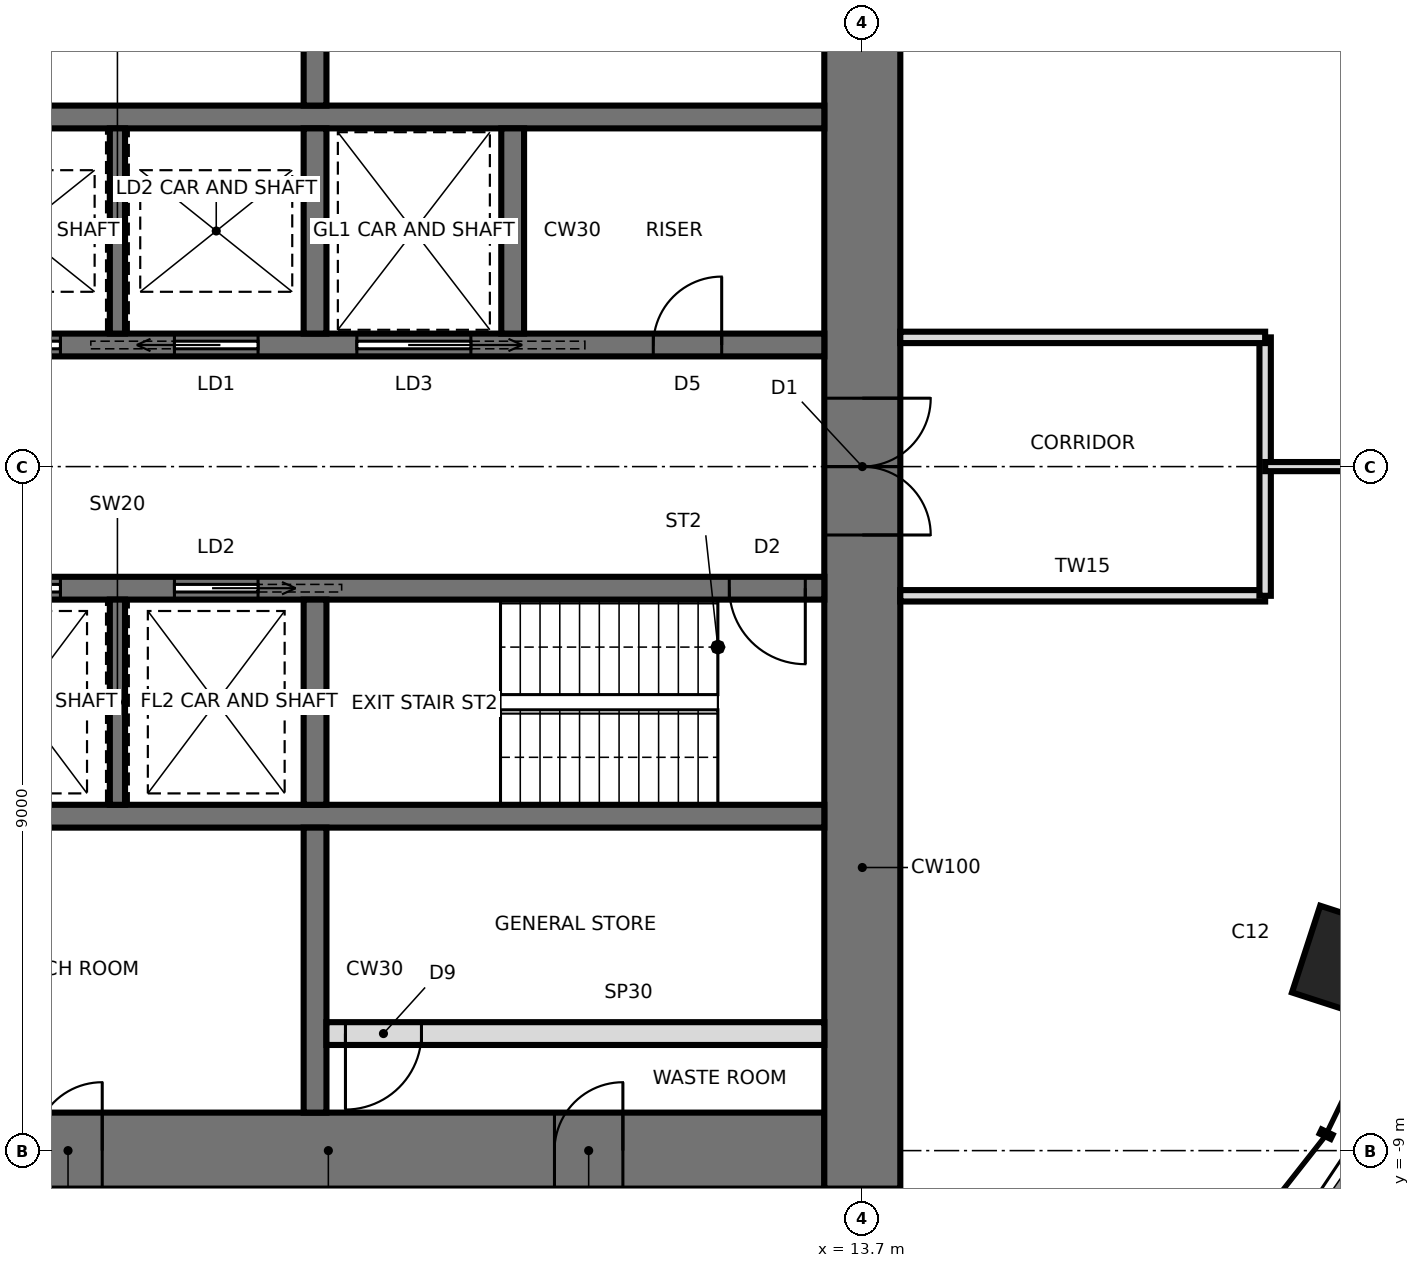
"""IFC4 building model, lengths in metres.
Left out: names, types, materials, properties, quantities, classifications, styles, units other than length and angle.
Written with IfcOpenShell. Run it as: python <this file> out.ifc"""

import sys

from ifc_helpers import new_model, si_unit, direction, frame, frame_2d, origin, origin_2d, place, context, subcontext, project, spatial, rectangle, extrude, element, fill, save


model = new_model("IFC4")
c1 = context("Model", 3, precision=1e-05, world=origin(), true_north=direction((0.0, 1.0)))
c2 = subcontext(c1, "Body", "Model", "MODEL_VIEW")
j1 = project(units=[si_unit("LENGTHUNIT", "METRE"), si_unit("PLANEANGLEUNIT", "RADIAN")], contexts=[c1])
p1 = place(None, origin())
s1 = spatial("IfcSite", under=j1, at=p1, CompositionType="ELEMENT")
p2 = place(p1, origin())
s2 = spatial("IfcBuilding", under=s1, at=p2, CompositionType="ELEMENT")
p3 = place(p2, frame((0.0, 0.0, 272.8)))
s3 = spatial("IfcBuildingStorey", under=s2, at=p3, CompositionType="ELEMENT", Elevation=272.8)
p4 = place(p3, frame((20.109, -6.534, 0.0), z_axis=(0.0, 0.0, 1.0), x_axis=(0.951056516295, -0.309016994375, 0.0)))
e1 = element("IfcColumn", 1, at=p4, inside=s3, PredefinedType="COLUMN", context=c2, shape_type="SweptSolid", body=[
    extrude(rectangle(XDim=1.2, YDim=1.2, at=origin_2d()), origin(), (0.0, 0.0, 1.0), 4.2),
])
p5 = place(p3, frame((-13.2, -9.0, 0.0), z_axis=(0.0, 0.0, 1.0), x_axis=(1.0, 0.0, 0.0)))
e2 = element("IfcWall", 2, at=p5, inside=s3, PredefinedType="SHEAR", context=c2, shape_type="SweptSolid", body=[
    extrude(rectangle(XDim=26.4, YDim=1.0, at=frame_2d((13.2, 0.0))), origin(), (0.0, 0.0, 1.0), 4.2),
])
p6 = place(p5, frame((2.65, 0.0, 0.0)))
e3 = element("IfcOpeningElement", 3, at=p6, cuts=e2, PredefinedType="OPENING", context=c2, shape_type="SweptSolid", body=[
    extrude(rectangle(XDim=0.9, YDim=2.1, at=frame_2d((0.45, 1.05))), frame((0.0, 0.51, 0.0), z_axis=(0.0, -1.0, 0.0), x_axis=(1.0, 0.0, 0.0)), (0.0, 0.0, 1.0), 1.02),
])
p7 = place(p5, frame((9.5, 0.0, 0.0)))
e4 = element("IfcOpeningElement", 4, at=p7, cuts=e2, PredefinedType="OPENING", context=c2, shape_type="SweptSolid", body=[
    extrude(rectangle(XDim=0.9, YDim=2.1, at=frame_2d((0.45, 1.05))), frame((0.0, 0.51, 0.0), z_axis=(0.0, -1.0, 0.0), x_axis=(1.0, 0.0, 0.0)), (0.0, 0.0, 1.0), 1.02),
])
p8 = place(p5, frame((16.0, 0.0, 0.0)))
e5 = element("IfcOpeningElement", 5, at=p8, cuts=e2, PredefinedType="OPENING", context=c2, shape_type="SweptSolid", body=[
    extrude(rectangle(XDim=0.9, YDim=2.1, at=frame_2d((0.45, 1.05))), frame((0.0, 0.51, 0.0), z_axis=(0.0, -1.0, 0.0), x_axis=(1.0, 0.0, 0.0)), (0.0, 0.0, 1.0), 1.02),
])
p9 = place(p5, frame((22.85, 0.0, 0.0)))
e6 = element("IfcOpeningElement", 6, at=p9, cuts=e2, PredefinedType="OPENING", context=c2, shape_type="SweptSolid", body=[
    extrude(rectangle(XDim=0.9, YDim=2.1, at=frame_2d((0.45, 1.05))), frame((0.0, 0.51, 0.0), z_axis=(0.0, -1.0, 0.0), x_axis=(1.0, 0.0, 0.0)), (0.0, 0.0, 1.0), 1.02),
])
p10 = place(p3, frame((13.7, -9.5, 0.0), z_axis=(0.0, 0.0, 1.0), x_axis=(0.0, 1.0, 0.0)))
e7 = element("IfcWall", 7, at=p10, inside=s3, PredefinedType="SHEAR", context=c2, shape_type="SweptSolid", body=[
    extrude(rectangle(XDim=19.0, YDim=1.0, at=frame_2d((9.5, 0.0))), origin(), (0.0, 0.0, 1.0), 4.2),
])
p11 = place(p10, frame((8.6, 0.0, 0.0)))
e8 = element("IfcOpeningElement", 8, at=p11, cuts=e7, PredefinedType="OPENING", context=c2, shape_type="SweptSolid", body=[
    extrude(rectangle(XDim=1.8, YDim=2.4, at=frame_2d((0.9, 1.2))), frame((0.0, 0.51, 0.0), z_axis=(0.0, -1.0, 0.0), x_axis=(1.0, 0.0, 0.0)), (0.0, 0.0, 1.0), 1.02),
])
p12 = place(p3, frame((-13.2, 1.6, 0.0), z_axis=(0.0, 0.0, 1.0), x_axis=(1.0, 0.0, 0.0)))
e9 = element("IfcWall", 9, at=p12, inside=s3, PredefinedType="SHEAR", context=c2, shape_type="SweptSolid", body=[
    extrude(rectangle(XDim=26.4, YDim=0.3, at=frame_2d((13.2, 0.0))), origin(), (0.0, 0.0, 1.0), 4.2),
])
p13 = place(p12, frame((0.25, 0.0, 0.0)))
e10 = element("IfcOpeningElement", 10, at=p13, cuts=e9, PredefinedType="OPENING", context=c2, shape_type="SweptSolid", body=[
    extrude(rectangle(XDim=1.0, YDim=2.1, at=frame_2d((0.5, 1.05))), frame((0.0, 0.16, 0.0), z_axis=(0.0, -1.0, 0.0), x_axis=(1.0, 0.0, 0.0)), (0.0, 0.0, 1.0), 0.32),
])
p14 = place(p12, frame((20.25, 0.0, 0.0)))
e11 = element("IfcOpeningElement", 11, at=p14, cuts=e9, PredefinedType="OPENING", context=c2, shape_type="SweptSolid", body=[
    extrude(rectangle(XDim=1.5, YDim=2.4, at=frame_2d((0.75, 1.2))), frame((0.0, 0.16, 0.0), z_axis=(0.0, -1.0, 0.0), x_axis=(1.0, 0.0, 0.0)), (0.0, 0.0, 1.0), 0.32),
])
p15 = place(p12, frame((7.55, 0.0, 0.0)))
e12 = element("IfcOpeningElement", 12, at=p15, cuts=e9, PredefinedType="OPENING", context=c2, shape_type="SweptSolid", body=[
    extrude(rectangle(XDim=0.9, YDim=2.1, at=frame_2d((0.45, 1.05))), frame((0.0, 0.16, 0.0), z_axis=(0.0, -1.0, 0.0), x_axis=(1.0, 0.0, 0.0)), (0.0, 0.0, 1.0), 0.32),
])
p16 = place(p12, frame((10.15, 0.0, 0.0)))
e13 = element("IfcOpeningElement", 13, at=p16, cuts=e9, PredefinedType="OPENING", context=c2, shape_type="SweptSolid", body=[
    extrude(rectangle(XDim=0.9, YDim=2.1, at=frame_2d((0.45, 1.05))), frame((0.0, 0.16, 0.0), z_axis=(0.0, -1.0, 0.0), x_axis=(1.0, 0.0, 0.0)), (0.0, 0.0, 1.0), 0.32),
])
p17 = place(p12, frame((12.75, 0.0, 0.0)))
e14 = element("IfcOpeningElement", 14, at=p17, cuts=e9, PredefinedType="OPENING", context=c2, shape_type="SweptSolid", body=[
    extrude(rectangle(XDim=0.9, YDim=2.1, at=frame_2d((0.45, 1.05))), frame((0.0, 0.16, 0.0), z_axis=(0.0, -1.0, 0.0), x_axis=(1.0, 0.0, 0.0)), (0.0, 0.0, 1.0), 0.32),
])
p18 = place(p12, frame((15.25, 0.0, 0.0)))
e15 = element("IfcOpeningElement", 15, at=p18, cuts=e9, PredefinedType="OPENING", context=c2, shape_type="SweptSolid", body=[
    extrude(rectangle(XDim=1.1, YDim=2.3, at=frame_2d((0.55, 1.15))), frame((0.0, 0.16, 0.0), z_axis=(0.0, -1.0, 0.0), x_axis=(1.0, 0.0, 0.0)), (0.0, 0.0, 1.0), 0.32),
])
p19 = place(p12, frame((17.85, 0.0, 0.0)))
e16 = element("IfcOpeningElement", 16, at=p19, cuts=e9, PredefinedType="OPENING", context=c2, shape_type="SweptSolid", body=[
    extrude(rectangle(XDim=1.1, YDim=2.3, at=frame_2d((0.55, 1.15))), frame((0.0, 0.16, 0.0), z_axis=(0.0, -1.0, 0.0), x_axis=(1.0, 0.0, 0.0)), (0.0, 0.0, 1.0), 0.32),
])
p20 = place(p12, frame((24.15, 0.0, 0.0)))
e17 = element("IfcOpeningElement", 17, at=p20, cuts=e9, PredefinedType="OPENING", context=c2, shape_type="SweptSolid", body=[
    extrude(rectangle(XDim=0.9, YDim=2.1, at=frame_2d((0.45, 1.05))), frame((0.0, 0.16, 0.0), z_axis=(0.0, -1.0, 0.0), x_axis=(1.0, 0.0, 0.0)), (0.0, 0.0, 1.0), 0.32),
])
p21 = place(p3, frame((-13.2, -1.6, 0.0), z_axis=(0.0, 0.0, 1.0), x_axis=(1.0, 0.0, 0.0)))
e18 = element("IfcWall", 18, at=p21, inside=s3, PredefinedType="SHEAR", context=c2, shape_type="SweptSolid", body=[
    extrude(rectangle(XDim=26.4, YDim=0.3, at=frame_2d((13.2, 0.0))), origin(), (0.0, 0.0, 1.0), 4.2),
])
p22 = place(p21, frame((25.15, 0.0, 0.0)))
e19 = element("IfcOpeningElement", 19, at=p22, cuts=e18, PredefinedType="OPENING", context=c2, shape_type="SweptSolid", body=[
    extrude(rectangle(XDim=1.0, YDim=2.1, at=frame_2d((0.5, 1.05))), frame((0.0, 0.16, 0.0), z_axis=(0.0, -1.0, 0.0), x_axis=(1.0, 0.0, 0.0)), (0.0, 0.0, 1.0), 0.32),
])
p23 = place(p21, frame((7.55, 0.0, 0.0)))
e20 = element("IfcOpeningElement", 20, at=p23, cuts=e18, PredefinedType="OPENING", context=c2, shape_type="SweptSolid", body=[
    extrude(rectangle(XDim=0.9, YDim=2.1, at=frame_2d((0.45, 1.05))), frame((0.0, 0.16, 0.0), z_axis=(0.0, -1.0, 0.0), x_axis=(1.0, 0.0, 0.0)), (0.0, 0.0, 1.0), 0.32),
])
p24 = place(p21, frame((10.15, 0.0, 0.0)))
e21 = element("IfcOpeningElement", 21, at=p24, cuts=e18, PredefinedType="OPENING", context=c2, shape_type="SweptSolid", body=[
    extrude(rectangle(XDim=0.9, YDim=2.1, at=frame_2d((0.45, 1.05))), frame((0.0, 0.16, 0.0), z_axis=(0.0, -1.0, 0.0), x_axis=(1.0, 0.0, 0.0)), (0.0, 0.0, 1.0), 0.32),
])
p25 = place(p21, frame((12.75, 0.0, 0.0)))
e22 = element("IfcOpeningElement", 22, at=p25, cuts=e18, PredefinedType="OPENING", context=c2, shape_type="SweptSolid", body=[
    extrude(rectangle(XDim=0.9, YDim=2.1, at=frame_2d((0.45, 1.05))), frame((0.0, 0.16, 0.0), z_axis=(0.0, -1.0, 0.0), x_axis=(1.0, 0.0, 0.0)), (0.0, 0.0, 1.0), 0.32),
])
p26 = place(p21, frame((15.25, 0.0, 0.0)))
e23 = element("IfcOpeningElement", 23, at=p26, cuts=e18, PredefinedType="OPENING", context=c2, shape_type="SweptSolid", body=[
    extrude(rectangle(XDim=1.1, YDim=2.3, at=frame_2d((0.55, 1.15))), frame((0.0, 0.16, 0.0), z_axis=(0.0, -1.0, 0.0), x_axis=(1.0, 0.0, 0.0)), (0.0, 0.0, 1.0), 0.32),
])
p27 = place(p21, frame((17.85, 0.0, 0.0)))
e24 = element("IfcOpeningElement", 24, at=p27, cuts=e18, PredefinedType="OPENING", context=c2, shape_type="SweptSolid", body=[
    extrude(rectangle(XDim=1.1, YDim=2.3, at=frame_2d((0.55, 1.15))), frame((0.0, 0.16, 0.0), z_axis=(0.0, -1.0, 0.0), x_axis=(1.0, 0.0, 0.0)), (0.0, 0.0, 1.0), 0.32),
])
p28 = place(p21, frame((5.55, 0.0, 0.0)))
e25 = element("IfcOpeningElement", 25, at=p28, cuts=e18, PredefinedType="OPENING", context=c2, shape_type="SweptSolid", body=[
    extrude(rectangle(XDim=0.9, YDim=2.1, at=frame_2d((0.45, 1.05))), frame((0.0, 0.16, 0.0), z_axis=(0.0, -1.0, 0.0), x_axis=(1.0, 0.0, 0.0)), (0.0, 0.0, 1.0), 0.32),
])
for number, where, z_axis, x_axis in (
    (26, (-13.2, 4.6, 0.0), (0.0, 0.0, 1.0), (1.0, 0.0, 0.0)),
    (27, (-13.2, -4.6, 0.0), (0.0, 0.0, 1.0), (1.0, 0.0, 0.0)),
):
    element("IfcWall", number, at=place(p3, frame(where, z_axis=z_axis, x_axis=x_axis)), inside=s3, PredefinedType="SHEAR", context=c2, shape_type="SweptSolid", body=[
        extrude(rectangle(XDim=26.4, YDim=0.3, at=frame_2d((13.2, 0.0))), origin(), (0.0, 0.0, 1.0), 4.2),
    ])
p29 = place(p3, frame((6.5, 1.75, 0.0), z_axis=(0.0, 0.0, 1.0), x_axis=(0.0, 1.0, 0.0)))
e28 = element("IfcWall", 28, at=p29, inside=s3, PredefinedType="SHEAR", context=c2, shape_type="SweptSolid", body=[
    extrude(rectangle(XDim=2.7, YDim=0.3, at=frame_2d((1.35, 0.0))), origin(), (0.0, 0.0, 1.0), 4.2),
])
p30 = place(p3, frame((6.5, 4.75, 0.0), z_axis=(0.0, 0.0, 1.0), x_axis=(0.0, 1.0, 0.0)))
e29 = element("IfcWall", 29, at=p30, inside=s3, PredefinedType="SHEAR", context=c2, shape_type="SweptSolid", body=[
    extrude(rectangle(XDim=3.75, YDim=0.3, at=frame_2d((1.875, 0.0))), origin(), (0.0, 0.0, 1.0), 4.2),
])
p31 = place(p3, frame((3.9, 1.75, 0.0), z_axis=(0.0, 0.0, 1.0), x_axis=(0.0, 1.0, 0.0)))
e30 = element("IfcWall", 30, at=p31, inside=s3, PredefinedType="SHEAR", context=c2, shape_type="SweptSolid", body=[
    extrude(rectangle(XDim=2.7, YDim=0.2, at=frame_2d((1.35, 0.0))), origin(), (0.0, 0.0, 1.0), 4.2),
])
p32 = place(p3, frame((6.5, -1.75, 0.0), z_axis=(0.0, 0.0, 1.0), x_axis=(0.0, -1.0, 0.0)))
e31 = element("IfcWall", 31, at=p32, inside=s3, PredefinedType="SHEAR", context=c2, shape_type="SweptSolid", body=[
    extrude(rectangle(XDim=2.7, YDim=0.3, at=frame_2d((1.35, 0.0))), origin(), (0.0, 0.0, 1.0), 4.2),
])
p33 = place(p3, frame((6.5, -4.75, 0.0), z_axis=(0.0, 0.0, 1.0), x_axis=(0.0, -1.0, 0.0)))
e32 = element("IfcWall", 32, at=p33, inside=s3, PredefinedType="SHEAR", context=c2, shape_type="SweptSolid", body=[
    extrude(rectangle(XDim=3.75, YDim=0.3, at=frame_2d((1.875, 0.0))), origin(), (0.0, 0.0, 1.0), 4.2),
])
p34 = place(p3, frame((3.9, -1.75, 0.0), z_axis=(0.0, 0.0, 1.0), x_axis=(0.0, -1.0, 0.0)))
e33 = element("IfcWall", 33, at=p34, inside=s3, PredefinedType="SHEAR", context=c2, shape_type="SweptSolid", body=[
    extrude(rectangle(XDim=2.7, YDim=0.2, at=frame_2d((1.35, 0.0))), origin(), (0.0, 0.0, 1.0), 4.2),
])
p35 = place(p3, frame((9.1, 1.75, 0.0), z_axis=(0.0, 0.0, 1.0), x_axis=(0.0, 1.0, 0.0)))
e34 = element("IfcWall", 34, at=p35, inside=s3, PredefinedType="SHEAR", context=c2, shape_type="SweptSolid", body=[
    extrude(rectangle(XDim=2.7, YDim=0.3, at=frame_2d((1.35, 0.0))), origin(), (0.0, 0.0, 1.0), 4.2),
])
p36 = place(p3, frame((6.65, -7.46, 0.0), z_axis=(0.0, 0.0, 1.0), x_axis=(1.0, 0.0, 0.0)))
e35 = element("IfcWall", 35, at=p36, inside=s3, PredefinedType="PARTITIONING", context=c2, shape_type="SweptSolid", body=[
    extrude(rectangle(XDim=6.55, YDim=0.3, at=frame_2d((3.275, 0.0))), origin(), (0.0, 0.0, 1.0), 4.0),
])
p37 = place(p36, frame((0.25, 0.0, 0.0)))
e36 = element("IfcOpeningElement", 36, at=p37, cuts=e35, PredefinedType="OPENING", context=c2, shape_type="SweptSolid", body=[
    extrude(rectangle(XDim=1.0, YDim=2.4, at=frame_2d((0.5, 1.2))), frame((0.0, 0.16, 0.0), z_axis=(0.0, -1.0, 0.0), x_axis=(1.0, 0.0, 0.0)), (0.0, 0.0, 1.0), 0.32),
])
p38 = place(p3, frame((14.2, -1.7, 0.0), z_axis=(0.0, 0.0, 1.0), x_axis=(1.0, 0.0, 0.0)))
e37 = element("IfcWall", 37, at=p38, inside=s3, PredefinedType="PARTITIONING", context=c2, shape_type="SweptSolid", body=[
    extrude(rectangle(XDim=4.8, YDim=0.15, at=frame_2d((2.4, 0.0))), origin(), (0.0, 0.0, 1.0), 4.0),
])
p39 = place(p3, frame((19.0, -1.7, 0.0), z_axis=(0.0, 0.0, 1.0), x_axis=(0.0, 1.0, 0.0)))
e38 = element("IfcWall", 38, at=p39, inside=s3, PredefinedType="PARTITIONING", context=c2, shape_type="SweptSolid", body=[
    extrude(rectangle(XDim=3.4, YDim=0.15, at=frame_2d((1.7, 0.0))), origin(), (0.0, 0.0, 1.0), 3.546),
])
p40 = place(p3, frame((22.67, 0.0, 0.0), z_axis=(0.0, 0.0, 1.0), x_axis=(-1.0, 0.0, 0.0)))
e39 = element("IfcWall", 39, at=p40, inside=s3, PredefinedType="PARTITIONING", context=c2, shape_type="SweptSolid", body=[
    extrude(rectangle(XDim=3.67, YDim=0.12, at=frame_2d((1.835, 0.0))), origin(), (0.0, 0.0, 1.0), 3.1),
])
p41 = place(p3, frame((19.0, 1.7, 0.0), z_axis=(0.0, 0.0, 1.0), x_axis=(-1.0, 0.0, 0.0)))
e40 = element("IfcWall", 40, at=p41, inside=s3, PredefinedType="PARTITIONING", context=c2, shape_type="SweptSolid", body=[
    extrude(rectangle(XDim=4.8, YDim=0.15, at=frame_2d((2.4, 0.0))), origin(), (0.0, 0.0, 1.0), 4.0),
])
p42 = place(p11, frame((1.8, 0.0, 0.0), z_axis=(0.0, 0.0, 1.0), x_axis=(-1.0, 0.0, 0.0)))
e41 = element("IfcDoor", 41, at=p42, inside=s3, OperationType="DOUBLE_DOOR_SINGLE_SWING", PredefinedType="DOOR", context=c2, shape_type="SweptSolid", body=[
    extrude(rectangle(XDim=1.72, YDim=2.36, at=frame_2d((0.9, 1.18))), frame((0.0, 0.025, 0.0), z_axis=(0.0, -1.0, 0.0), x_axis=(1.0, 0.0, 0.0)), (0.0, 0.0, 1.0), 0.05),
    extrude(rectangle(XDim=0.04, YDim=2.4, at=frame_2d((1.78, 1.2))), frame((0.0, 0.25, 0.0), z_axis=(0.0, -1.0, 0.0), x_axis=(1.0, 0.0, 0.0)), (0.0, 0.0, 1.0), 0.5),
    extrude(rectangle(XDim=0.04, YDim=2.4, at=frame_2d((0.02, 1.2))), frame((0.0, 0.25, 0.0), z_axis=(0.0, -1.0, 0.0), x_axis=(1.0, 0.0, 0.0)), (0.0, 0.0, 1.0), 0.5),
    extrude(rectangle(XDim=1.72, YDim=0.04, at=frame_2d((0.9, 2.38))), frame((0.0, 0.25, 0.0), z_axis=(0.0, -1.0, 0.0), x_axis=(1.0, 0.0, 0.0)), (0.0, 0.0, 1.0), 0.5),
])
fill(e8, e41)
p43 = place(p22, frame((1.0, 0.0, 0.0), z_axis=(0.0, 0.0, 1.0), x_axis=(-1.0, 0.0, 0.0)))
e42 = element("IfcDoor", 42, at=p43, inside=s3, OperationType="SINGLE_SWING_LEFT", PredefinedType="DOOR", context=c2, shape_type="SweptSolid", body=[
    extrude(rectangle(XDim=1.0, YDim=2.1, at=frame_2d((0.5, 1.05))), frame((0.0, 0.025, 0.0), z_axis=(0.0, -1.0, 0.0), x_axis=(1.0, 0.0, 0.0)), (0.0, 0.0, 1.0), 0.05),
])
fill(e19, e42)
p44 = place(p14, origin())
e43 = element("IfcDoor", 43, at=p44, inside=s3, OperationType="SLIDING_TO_RIGHT", PredefinedType="DOOR", context=c2, shape_type="SweptSolid", body=[
    extrude(rectangle(XDim=1.5, YDim=2.4, at=frame_2d((0.75, 1.2))), frame((0.0, 0.025, 0.0), z_axis=(0.0, -1.0, 0.0), x_axis=(1.0, 0.0, 0.0)), (0.0, 0.0, 1.0), 0.05),
])
fill(e11, e43)
p45 = place(p18, origin())
e44 = element("IfcDoor", 44, at=p45, inside=s3, OperationType="SLIDING_TO_LEFT", PredefinedType="DOOR", context=c2, shape_type="SweptSolid", body=[
    extrude(rectangle(XDim=1.1, YDim=2.3, at=frame_2d((0.55, 1.15))), frame((0.0, 0.025, 0.0), z_axis=(0.0, -1.0, 0.0), x_axis=(1.0, 0.0, 0.0)), (0.0, 0.0, 1.0), 0.05),
])
fill(e15, e44)
p46 = place(p19, origin())
e45 = element("IfcDoor", 45, at=p46, inside=s3, OperationType="SLIDING_TO_LEFT", PredefinedType="DOOR", context=c2, shape_type="SweptSolid", body=[
    extrude(rectangle(XDim=1.1, YDim=2.3, at=frame_2d((0.55, 1.15))), frame((0.0, 0.025, 0.0), z_axis=(0.0, -1.0, 0.0), x_axis=(1.0, 0.0, 0.0)), (0.0, 0.0, 1.0), 0.05),
])
fill(e16, e45)
p47 = place(p26, frame((1.1, 0.0, 0.0), z_axis=(0.0, 0.0, 1.0), x_axis=(-1.0, 0.0, 0.0)))
e46 = element("IfcDoor", 46, at=p47, inside=s3, OperationType="SLIDING_TO_RIGHT", PredefinedType="DOOR", context=c2, shape_type="SweptSolid", body=[
    extrude(rectangle(XDim=1.1, YDim=2.3, at=frame_2d((0.55, 1.15))), frame((0.0, 0.025, 0.0), z_axis=(0.0, -1.0, 0.0), x_axis=(1.0, 0.0, 0.0)), (0.0, 0.0, 1.0), 0.05),
])
fill(e23, e46)
p48 = place(p27, frame((1.1, 0.0, 0.0), z_axis=(0.0, 0.0, 1.0), x_axis=(-1.0, 0.0, 0.0)))
e47 = element("IfcDoor", 47, at=p48, inside=s3, OperationType="SLIDING_TO_LEFT", PredefinedType="DOOR", context=c2, shape_type="SweptSolid", body=[
    extrude(rectangle(XDim=1.1, YDim=2.3, at=frame_2d((0.55, 1.15))), frame((0.0, 0.025, 0.0), z_axis=(0.0, -1.0, 0.0), x_axis=(1.0, 0.0, 0.0)), (0.0, 0.0, 1.0), 0.05),
])
fill(e24, e47)
p49 = place(p20, origin())
e48 = element("IfcDoor", 48, at=p49, inside=s3, OperationType="SINGLE_SWING_RIGHT", PredefinedType="DOOR", context=c2, shape_type="SweptSolid", body=[
    extrude(rectangle(XDim=0.9, YDim=2.1, at=frame_2d((0.45, 1.05))), frame((0.0, 0.025, 0.0), z_axis=(0.0, -1.0, 0.0), x_axis=(1.0, 0.0, 0.0)), (0.0, 0.0, 1.0), 0.05),
])
fill(e17, e48)
p50 = place(p8, origin())
e49 = element("IfcDoor", 49, at=p50, inside=s3, OperationType="SINGLE_SWING_RIGHT", PredefinedType="DOOR", context=c2, shape_type="SweptSolid", body=[
    extrude(rectangle(XDim=0.82, YDim=2.06, at=frame_2d((0.45, 1.03))), frame((0.0, 0.025, 0.0), z_axis=(0.0, -1.0, 0.0), x_axis=(1.0, 0.0, 0.0)), (0.0, 0.0, 1.0), 0.05),
    extrude(rectangle(XDim=0.04, YDim=2.1, at=frame_2d((0.02, 1.05))), frame((0.0, 0.25, 0.0), z_axis=(0.0, -1.0, 0.0), x_axis=(1.0, 0.0, 0.0)), (0.0, 0.0, 1.0), 0.5),
    extrude(rectangle(XDim=0.04, YDim=2.1, at=frame_2d((0.88, 1.05))), frame((0.0, 0.25, 0.0), z_axis=(0.0, -1.0, 0.0), x_axis=(1.0, 0.0, 0.0)), (0.0, 0.0, 1.0), 0.5),
    extrude(rectangle(XDim=0.82, YDim=0.04, at=frame_2d((0.45, 2.08))), frame((0.0, 0.25, 0.0), z_axis=(0.0, -1.0, 0.0), x_axis=(1.0, 0.0, 0.0)), (0.0, 0.0, 1.0), 0.5),
])
fill(e5, e49)
p51 = place(p9, origin())
e50 = element("IfcDoor", 50, at=p51, inside=s3, OperationType="SINGLE_SWING_RIGHT", PredefinedType="DOOR", context=c2, shape_type="SweptSolid", body=[
    extrude(rectangle(XDim=0.82, YDim=2.06, at=frame_2d((0.45, 1.03))), frame((0.0, 0.025, 0.0), z_axis=(0.0, -1.0, 0.0), x_axis=(1.0, 0.0, 0.0)), (0.0, 0.0, 1.0), 0.05),
    extrude(rectangle(XDim=0.04, YDim=2.1, at=frame_2d((0.02, 1.05))), frame((0.0, 0.25, 0.0), z_axis=(0.0, -1.0, 0.0), x_axis=(1.0, 0.0, 0.0)), (0.0, 0.0, 1.0), 0.5),
    extrude(rectangle(XDim=0.04, YDim=2.1, at=frame_2d((0.88, 1.05))), frame((0.0, 0.25, 0.0), z_axis=(0.0, -1.0, 0.0), x_axis=(1.0, 0.0, 0.0)), (0.0, 0.0, 1.0), 0.5),
    extrude(rectangle(XDim=0.82, YDim=0.04, at=frame_2d((0.45, 2.08))), frame((0.0, 0.25, 0.0), z_axis=(0.0, -1.0, 0.0), x_axis=(1.0, 0.0, 0.0)), (0.0, 0.0, 1.0), 0.5),
])
fill(e6, e50)
p52 = place(p37, frame((1.0, 0.0, 0.0), z_axis=(0.0, 0.0, 1.0), x_axis=(-1.0, 0.0, 0.0)))
e51 = element("IfcDoor", 51, at=p52, inside=s3, OperationType="SINGLE_SWING_RIGHT", PredefinedType="DOOR", context=c2, shape_type="SweptSolid", body=[
    extrude(rectangle(XDim=1.0, YDim=2.4, at=frame_2d((0.5, 1.2))), frame((0.0, 0.025, 0.0), z_axis=(0.0, -1.0, 0.0), x_axis=(1.0, 0.0, 0.0)), (0.0, 0.0, 1.0), 0.05),
])
fill(e36, e51)
save(model, sys.argv[1])
